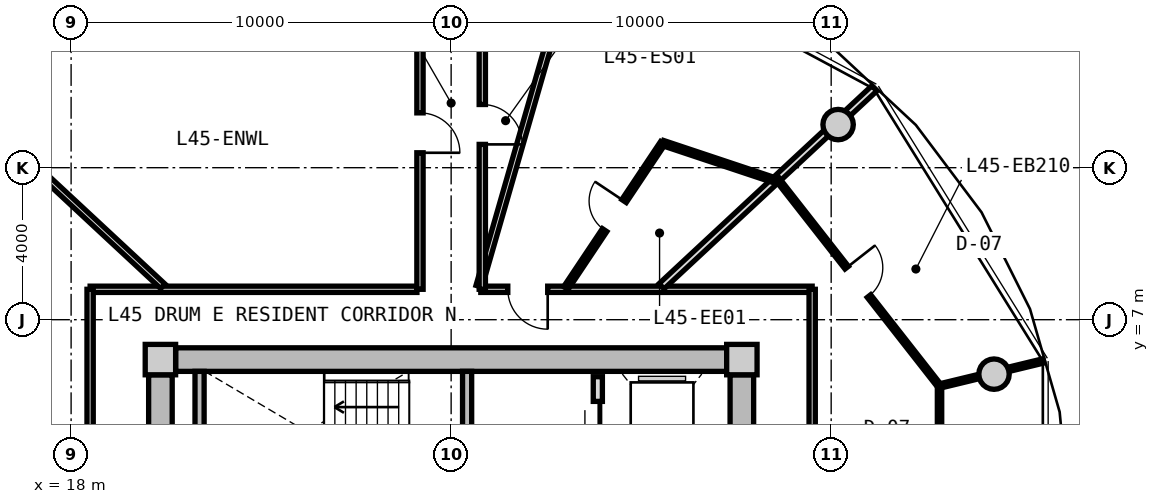
"""IFC4 building model, lengths in metres.
Left out: names, types, materials, properties, quantities, classifications, styles, units other than length and angle.
Written with IfcOpenShell. Run it as: python <this file> out.ifc"""

import sys

from ifc_helpers import new_model, si_unit, direction, frame, frame_2d, origin, origin_2d, place, context, subcontext, project, spatial, rectangle, circle, extrude, source, transform, mapped, element, fill, save


model = new_model("IFC4")
c1 = context("Model", 3, precision=1e-05, world=origin(), true_north=direction((0.0, 1.0)))
c2 = subcontext(c1, "Body", "Model", "MODEL_VIEW")
j1 = project(units=[si_unit("LENGTHUNIT", "METRE"), si_unit("PLANEANGLEUNIT", "RADIAN")], contexts=[c1])
p1 = place(None, origin())
s1 = spatial("IfcSite", under=j1, at=p1, CompositionType="ELEMENT")
p2 = place(p1, origin())
s2 = spatial("IfcBuilding", under=s1, at=p2, CompositionType="ELEMENT")
p3 = place(p2, frame((0.0, 0.0, 146.5)))
s3 = spatial("IfcBuildingStorey", under=s2, at=p3, CompositionType="ELEMENT", Elevation=146.5)
m1 = source(origin(), c2, "Body", "SweptSolid", [
    extrude(rectangle(XDim=0.8, YDim=0.8, at=origin_2d()), origin(), (0.0, 0.0, 1.0), 3.05),
])
for number, where, z_axis, x_axis in (
    (1, (35.65, 5.95, 0.0), (0.0, 0.0, 1.0), (1.0, 0.0, 0.0)),
    (2, (20.35, 5.95, 0.0), (0.0, 0.0, 1.0), (1.0, 0.0, 0.0)),
):
    element("IfcColumn", number, at=place(p3, frame(where, z_axis=z_axis, x_axis=x_axis)), inside=s3, PredefinedType="COLUMN", context=c2, shape_type="MappedRepresentation", body=[
        mapped(m1, transform((0.0, 0.0, 0.0), x_axis=(1.0, 0.0, 0.0), y_axis=(0.0, 1.0, 0.0), z_axis=(0.0, 0.0, 1.0), scale=1.0)),
    ])
m2 = source(origin(), c2, "Body", "SweptSolid", [
    extrude(rectangle(XDim=14.5, YDim=0.62, at=frame_2d((7.25, 0.0))), origin(), (0.0, 0.0, 1.0), 2.81),
])
p4 = place(p3, frame((20.75, 5.95, 0.0), z_axis=(0.0, 0.0, 1.0), x_axis=(1.0, 0.0, 0.0)))
e3 = element("IfcWall", 3, at=p4, inside=s3, PredefinedType="SHEAR", context=c2, shape_type="MappedRepresentation", body=[
    mapped(m2, transform((0.0, 0.0, 0.0), x_axis=(1.0, 0.0, 0.0), y_axis=(0.0, 1.0, 0.0), z_axis=(0.0, 0.0, 1.0), scale=1.0)),
])
m3 = source(origin(), c2, "Body", "SweptSolid", [
    extrude(rectangle(XDim=11.1, YDim=0.62, at=frame_2d((5.55, 0.0))), origin(), (0.0, 0.0, 1.0), 2.81),
])
p5 = place(p3, frame((20.35, -5.55, 0.0), z_axis=(0.0, 0.0, 1.0), x_axis=(0.0, 1.0, 0.0)))
e4 = element("IfcWall", 4, at=p5, inside=s3, PredefinedType="SHEAR", context=c2, shape_type="MappedRepresentation", body=[
    mapped(m3, transform((0.0, 0.0, 0.0), x_axis=(1.0, 0.0, 0.0), y_axis=(0.0, 1.0, 0.0), z_axis=(0.0, 0.0, 1.0), scale=1.0)),
])
p6 = place(p5, frame((3.8, 0.0, 0.0)))
e5 = element("IfcOpeningElement", 5, at=p6, cuts=e4, PredefinedType="OPENING", context=c2, shape_type="SweptSolid", body=[
    extrude(rectangle(XDim=1.2, YDim=2.15, at=frame_2d((0.6, 1.075))), frame((0.0, 0.32, 0.0), z_axis=(0.0, -1.0, 0.0), x_axis=(1.0, 0.0, 0.0)), (0.0, 0.0, 1.0), 0.64),
])
p7 = place(p3, frame((35.65, 5.55, 0.0), z_axis=(0.0, 0.0, 1.0), x_axis=(0.0, -1.0, 0.0)))
e6 = element("IfcWall", 6, at=p7, inside=s3, PredefinedType="SHEAR", context=c2, shape_type="MappedRepresentation", body=[
    mapped(m3, transform((0.0, 0.0, 0.0), x_axis=(1.0, 0.0, 0.0), y_axis=(0.0, 1.0, 0.0), z_axis=(0.0, 0.0, 1.0), scale=1.0)),
])
p8 = place(p7, frame((5.65, 0.0, 0.0)))
e7 = element("IfcOpeningElement", 7, at=p8, cuts=e6, PredefinedType="OPENING", context=c2, shape_type="SweptSolid", body=[
    extrude(rectangle(XDim=1.2, YDim=2.15, at=frame_2d((0.6, 1.075))), frame((0.0, 0.32, 0.0), z_axis=(0.0, -1.0, 0.0), x_axis=(1.0, 0.0, 0.0)), (0.0, 0.0, 1.0), 0.64),
])
m4 = source(origin(), c2, "Body", "SweptSolid", [
    extrude(circle(Radius=0.4, at=origin_2d()), origin(), (0.0, 0.0, 1.0), 3.05),
])
for number, where, z_axis, x_axis in (
    (8, (42.285, 5.567, 0.0), (0.0, 0.0, 1.0), (1.0, 0.0, 0.0)),
    (9, (38.183, 12.135, 0.0), (0.0, 0.0, 1.0), (1.0, 0.0, 0.0)),
):
    element("IfcColumn", number, at=place(p3, frame(where, z_axis=z_axis, x_axis=x_axis)), inside=s3, PredefinedType="COLUMN", context=c2, shape_type="MappedRepresentation", body=[
        mapped(m4, transform((0.0, 0.0, 0.0), x_axis=(1.0, 0.0, 0.0), y_axis=(0.0, 1.0, 0.0), z_axis=(0.0, 0.0, 1.0), scale=1.0)),
    ])
m5 = source(origin(), c2, "Body", "SweptSolid", [
    extrude(rectangle(XDim=3.19, YDim=0.24, at=frame_2d((1.595, 0.0))), origin(), (0.0, 0.0, 1.0), 2.81),
])
p9 = place(p3, frame((21.38, 2.45, 0.0), z_axis=(0.0, 0.0, 1.0), x_axis=(0.0, 1.0, 0.0)))
e10 = element("IfcWall", 10, at=p9, inside=s3, PredefinedType="PARTITIONING", context=c2, shape_type="MappedRepresentation", body=[
    mapped(m5, transform((0.0, 0.0, 0.0), x_axis=(1.0, 0.0, 0.0), y_axis=(0.0, 1.0, 0.0), z_axis=(0.0, 0.0, 1.0), scale=1.0)),
])
p10 = place(p3, frame((28.42, 2.45, 0.0), z_axis=(0.0, 0.0, 1.0), x_axis=(0.0, 1.0, 0.0)))
e11 = element("IfcWall", 11, at=p10, inside=s3, PredefinedType="PARTITIONING", context=c2, shape_type="MappedRepresentation", body=[
    mapped(m5, transform((0.0, 0.0, 0.0), x_axis=(1.0, 0.0, 0.0), y_axis=(0.0, 1.0, 0.0), z_axis=(0.0, 0.0, 1.0), scale=1.0)),
])
p11 = place(p10, frame((0.55, 0.0, 0.0)))
e12 = element("IfcOpeningElement", 12, at=p11, cuts=e11, PredefinedType="OPENING", context=c2, shape_type="SweptSolid", body=[
    extrude(rectangle(XDim=1.1, YDim=2.15, at=frame_2d((0.55, 1.075))), frame((0.0, 0.13, 0.0), z_axis=(0.0, -1.0, 0.0), x_axis=(1.0, 0.0, 0.0)), (0.0, 0.0, 1.0), 0.26),
])
m6 = source(origin(), c2, "Body", "SweptSolid", [
    extrude(rectangle(XDim=5.0, YDim=0.24, at=frame_2d((2.5, 0.0))), origin(), (0.0, 0.0, 1.0), 2.795),
])
p12 = place(p3, frame((31.86, 0.5, 0.0), z_axis=(0.0, 0.0, 1.0), x_axis=(0.0, 1.0, 0.0)))
e13 = element("IfcWall", 13, at=p12, inside=s3, PredefinedType="PARTITIONING", context=c2, shape_type="MappedRepresentation", body=[
    mapped(m6, transform((0.0, 0.0, 0.0), x_axis=(1.0, 0.0, 0.0), y_axis=(0.0, 1.0, 0.0), z_axis=(0.0, 0.0, 1.0), scale=1.0)),
])
p13 = place(p12, frame((3.05, 0.0, 0.0)))
e14 = element("IfcOpeningElement", 14, at=p13, cuts=e13, PredefinedType="OPENING", context=c2, shape_type="SweptSolid", body=[
    extrude(rectangle(XDim=1.3, YDim=2.2, at=frame_2d((0.65, 1.1))), frame((0.0, 0.13, 0.0), z_axis=(0.0, -1.0, 0.0), x_axis=(1.0, 0.0, 0.0)), (0.0, 0.0, 1.0), 0.26),
])
p14 = place(p12, frame((0.55, 0.0, 0.0)))
e15 = element("IfcOpeningElement", 15, at=p14, cuts=e13, PredefinedType="OPENING", context=c2, shape_type="SweptSolid", body=[
    extrude(rectangle(XDim=1.3, YDim=2.2, at=frame_2d((0.65, 1.1))), frame((0.0, 0.13, 0.0), z_axis=(0.0, -1.0, 0.0), x_axis=(1.0, 0.0, 0.0)), (0.0, 0.0, 1.0), 0.26),
])
m7 = source(origin(), c2, "Body", "SweptSolid", [
    extrude(rectangle(XDim=8.6, YDim=0.165, at=frame_2d((4.3, 0.0))), origin(), (0.0, 0.0, 1.0), 2.795),
])
p15 = place(p3, frame((18.5, 7.8, 0.0), z_axis=(0.0, 0.0, 1.0), x_axis=(1.0, 0.0, 0.0)))
e16 = element("IfcWall", 16, at=p15, inside=s3, PredefinedType="PARTITIONING", context=c2, shape_type="MappedRepresentation", body=[
    mapped(m7, transform((0.0, 0.0, 0.0), x_axis=(1.0, 0.0, 0.0), y_axis=(0.0, 1.0, 0.0), z_axis=(0.0, 0.0, 1.0), scale=1.0)),
])
m8 = source(origin(), c2, "Body", "SweptSolid", [
    extrude(rectangle(XDim=8.719, YDim=0.165, at=frame_2d((4.36, 0.0))), origin(), (0.0, 0.0, 1.0), 2.795),
])
p16 = place(p3, frame((28.781, 7.8, 0.0), z_axis=(0.0, 0.0, 1.0), x_axis=(1.0, 0.0, 0.0)))
e17 = element("IfcWall", 17, at=p16, inside=s3, PredefinedType="PARTITIONING", context=c2, shape_type="MappedRepresentation", body=[
    mapped(m8, transform((0.0, 0.0, 0.0), x_axis=(1.0, 0.0, 0.0), y_axis=(0.0, 1.0, 0.0), z_axis=(0.0, 0.0, 1.0), scale=1.0)),
])
p17 = place(p16, frame((0.71, 0.0, 0.0)))
e18 = element("IfcOpeningElement", 18, at=p17, cuts=e17, PredefinedType="OPENING", context=c2, shape_type="SweptSolid", body=[
    extrude(rectangle(XDim=1.05, YDim=2.15, at=frame_2d((0.525, 1.075))), frame((0.0, 0.093, 0.0), z_axis=(0.0, -1.0, 0.0), x_axis=(1.0, 0.0, 0.0)), (0.0, 0.0, 1.0), 0.185),
])
m9 = source(origin(), c2, "Body", "SweptSolid", [
    extrude(rectangle(XDim=15.6, YDim=0.165, at=frame_2d((7.8, 0.0))), origin(), (0.0, 0.0, 1.0), 2.795),
])
p18 = place(p3, frame((18.5, -7.8, 0.0), z_axis=(0.0, 0.0, 1.0), x_axis=(0.0, 1.0, 0.0)))
e19 = element("IfcWall", 19, at=p18, inside=s3, PredefinedType="PARTITIONING", context=c2, shape_type="MappedRepresentation", body=[
    mapped(m9, transform((0.0, 0.0, 0.0), x_axis=(1.0, 0.0, 0.0), y_axis=(0.0, 1.0, 0.0), z_axis=(0.0, 0.0, 1.0), scale=1.0)),
])
p19 = place(p18, frame((7.175, 0.0, 0.0)))
e20 = element("IfcOpeningElement", 20, at=p19, cuts=e19, PredefinedType="OPENING", context=c2, shape_type="SweptSolid", body=[
    extrude(rectangle(XDim=1.25, YDim=2.2, at=frame_2d((0.625, 1.1))), frame((0.0, 0.093, 0.0), z_axis=(0.0, -1.0, 0.0), x_axis=(1.0, 0.0, 0.0)), (0.0, 0.0, 1.0), 0.185),
])
p20 = place(p3, frame((37.5, 7.8, 0.0), z_axis=(0.0, 0.0, 1.0), x_axis=(0.0, -1.0, 0.0)))
e21 = element("IfcWall", 21, at=p20, inside=s3, PredefinedType="PARTITIONING", context=c2, shape_type="MappedRepresentation", body=[
    mapped(m9, transform((0.0, 0.0, 0.0), x_axis=(1.0, 0.0, 0.0), y_axis=(0.0, 1.0, 0.0), z_axis=(0.0, 0.0, 1.0), scale=1.0)),
])
p21 = place(p20, frame((5.687, 0.0, 0.0)))
e22 = element("IfcOpeningElement", 22, at=p21, cuts=e21, PredefinedType="OPENING", context=c2, shape_type="SweptSolid", body=[
    extrude(rectangle(XDim=1.05, YDim=2.15, at=frame_2d((0.525, 1.075))), frame((0.0, 0.093, 0.0), z_axis=(0.0, -1.0, 0.0), x_axis=(1.0, 0.0, 0.0)), (0.0, 0.0, 1.0), 0.185),
])
m10 = source(origin(), c2, "Body", "SweptSolid", [
    extrude(rectangle(XDim=9.73, YDim=0.165, at=frame_2d((4.865, 0.0))), origin(), (0.0, 0.0, 1.0), 2.345),
])
p22 = place(p3, frame((28.733, 7.88, 0.0), z_axis=(0.0, 0.0, 1.0), x_axis=(0.27679492614, 0.960929013436, 0.0)))
e23 = element("IfcWall", 23, at=p22, inside=s3, PredefinedType="PARTITIONING", context=c2, shape_type="MappedRepresentation", body=[
    mapped(m10, transform((0.0, 0.0, 0.0), x_axis=(1.0, 0.0, 0.0), y_axis=(0.0, 1.0, 0.0), z_axis=(0.0, 0.0, 1.0), scale=1.0)),
])
m11 = source(origin(), c2, "Body", "SweptSolid", [
    extrude(rectangle(XDim=7.648, YDim=0.165, at=frame_2d((3.824, 0.0))), origin(), (0.0, 0.0, 1.0), 2.345),
])
p23 = place(p3, frame((20.413, 7.88, 0.0), z_axis=(0.0, 0.0, 1.0), x_axis=(-0.732182665826, 0.681108320213, 0.0)))
e24 = element("IfcWall", 24, at=p23, inside=s3, PredefinedType="PARTITIONING", context=c2, shape_type="MappedRepresentation", body=[
    mapped(m11, transform((0.0, 0.0, 0.0), x_axis=(1.0, 0.0, 0.0), y_axis=(0.0, 1.0, 0.0), z_axis=(0.0, 0.0, 1.0), scale=1.0)),
])
m12 = source(origin(), c2, "Body", "SweptSolid", [
    extrude(rectangle(XDim=8.235, YDim=0.165, at=frame_2d((4.118, 0.0))), origin(), (0.0, 0.0, 1.0), 2.795),
])
p24 = place(p3, frame((27.18, 7.8, 0.0), z_axis=(0.0, 0.0, 1.0), x_axis=(0.0, 1.0, 0.0)))
e25 = element("IfcWall", 25, at=p24, inside=s3, PredefinedType="PARTITIONING", context=c2, shape_type="MappedRepresentation", body=[
    mapped(m12, transform((0.0, 0.0, 0.0), x_axis=(1.0, 0.0, 0.0), y_axis=(0.0, 1.0, 0.0), z_axis=(0.0, 0.0, 1.0), scale=1.0)),
])
p25 = place(p24, frame((3.593, 0.0, 0.0)))
e26 = element("IfcOpeningElement", 26, at=p25, cuts=e25, PredefinedType="OPENING", context=c2, shape_type="SweptSolid", body=[
    extrude(rectangle(XDim=1.05, YDim=2.15, at=frame_2d((0.525, 1.075))), frame((0.0, 0.093, 0.0), z_axis=(0.0, -1.0, 0.0), x_axis=(1.0, 0.0, 0.0)), (0.0, 0.0, 1.0), 0.185),
])
p26 = place(p3, frame((28.82, 7.8, 0.0), z_axis=(0.0, 0.0, 1.0), x_axis=(0.0, 1.0, 0.0)))
e27 = element("IfcWall", 27, at=p26, inside=s3, PredefinedType="PARTITIONING", context=c2, shape_type="MappedRepresentation", body=[
    mapped(m12, transform((0.0, 0.0, 0.0), x_axis=(1.0, 0.0, 0.0), y_axis=(0.0, 1.0, 0.0), z_axis=(0.0, 0.0, 1.0), scale=1.0)),
])
p27 = place(p26, frame((3.813, 0.0, 0.0)))
e28 = element("IfcOpeningElement", 28, at=p27, cuts=e27, PredefinedType="OPENING", context=c2, shape_type="SweptSolid", body=[
    extrude(rectangle(XDim=1.05, YDim=2.15, at=frame_2d((0.525, 1.075))), frame((0.0, 0.093, 0.0), z_axis=(0.0, -1.0, 0.0), x_axis=(1.0, 0.0, 0.0)), (0.0, 0.0, 1.0), 0.185),
])
m13 = source(origin(), c2, "Body", "SweptSolid", [
    extrude(rectangle(XDim=7.648, YDim=0.19, at=frame_2d((3.824, 0.0))), origin(), (0.0, 0.0, 1.0), 2.345),
])
p28 = place(p3, frame((33.538, 7.88, 0.0), z_axis=(0.0, 0.0, 1.0), x_axis=(0.732167856666, 0.681124239522, 0.0)))
e29 = element("IfcWall", 29, at=p28, inside=s3, PredefinedType="PARTITIONING", context=c2, shape_type="MappedRepresentation", body=[
    mapped(m13, transform((0.0, 0.0, 0.0), x_axis=(1.0, 0.0, 0.0), y_axis=(0.0, 1.0, 0.0), z_axis=(0.0, 0.0, 1.0), scale=1.0)),
])
m14 = source(origin(), c2, "Body", "SweptSolid", [
    extrude(rectangle(XDim=6.958, YDim=0.115, at=frame_2d((3.479, 0.0))), origin(), (0.0, 0.0, 1.0), 2.795),
])
p29 = place(p3, frame((40.851, -1.703, 0.0), z_axis=(0.0, 0.0, 1.0), x_axis=(0.0, 1.0, 0.0)))
e30 = element("IfcWall", 30, at=p29, inside=s3, PredefinedType="PARTITIONING", context=c2, shape_type="MappedRepresentation", body=[
    mapped(m14, transform((0.0, 0.0, 0.0), x_axis=(1.0, 0.0, 0.0), y_axis=(0.0, 1.0, 0.0), z_axis=(0.0, 0.0, 1.0), scale=1.0)),
])
p30 = place(p29, frame((3.004, 0.0, 0.0)))
e31 = element("IfcOpeningElement", 31, at=p30, cuts=e30, PredefinedType="OPENING", context=c2, shape_type="SweptSolid", body=[
    extrude(rectangle(XDim=0.95, YDim=2.1, at=frame_2d((0.475, 1.05))), frame((0.0, 0.067, 0.0), z_axis=(0.0, -1.0, 0.0), x_axis=(1.0, 0.0, 0.0)), (0.0, 0.0, 1.0), 0.135),
])
m15 = source(origin(), c2, "Body", "SweptSolid", [
    extrude(rectangle(XDim=6.966, YDim=0.115, at=frame_2d((3.483, 0.0))), origin(), (0.0, 0.0, 1.0), 2.795),
])
p31 = place(p3, frame((40.85, 5.254, 0.0), z_axis=(0.0, 0.0, 1.0), x_axis=(-0.616695640563, 0.787201681217, 0.0)))
e32 = element("IfcWall", 32, at=p31, inside=s3, PredefinedType="PARTITIONING", context=c2, shape_type="MappedRepresentation", body=[
    mapped(m15, transform((0.0, 0.0, 0.0), x_axis=(1.0, 0.0, 0.0), y_axis=(0.0, 1.0, 0.0), z_axis=(0.0, 0.0, 1.0), scale=1.0)),
])
p32 = place(p31, frame((3.008, 0.0, 0.0)))
e33 = element("IfcOpeningElement", 33, at=p32, cuts=e32, PredefinedType="OPENING", context=c2, shape_type="SweptSolid", body=[
    extrude(rectangle(XDim=0.95, YDim=2.1, at=frame_2d((0.475, 1.05))), frame((0.0, 0.067, 0.0), z_axis=(0.0, -1.0, 0.0), x_axis=(1.0, 0.0, 0.0)), (0.0, 0.0, 1.0), 0.135),
])
m16 = source(origin(), c2, "Body", "SweptSolid", [
    extrude(rectangle(XDim=2.818, YDim=0.115, at=frame_2d((1.409, 0.0))), origin(), (0.0, 0.0, 1.0), 2.345),
])
p33 = place(p3, frame((40.85, 5.254, 0.0), z_axis=(0.0, 0.0, 1.0), x_axis=(0.971949193017, 0.235190914353, 0.0)))
e34 = element("IfcWall", 34, at=p33, inside=s3, PredefinedType="PARTITIONING", context=c2, shape_type="MappedRepresentation", body=[
    mapped(m16, transform((0.0, 0.0, 0.0), x_axis=(1.0, 0.0, 0.0), y_axis=(0.0, 1.0, 0.0), z_axis=(0.0, 0.0, 1.0), scale=1.0)),
])
m17 = source(origin(), c2, "Body", "SweptSolid", [
    extrude(rectangle(XDim=4.593, YDim=0.14, at=frame_2d((2.296, 0.0))), origin(), (0.0, 0.0, 1.0), 2.795),
])
p34 = place(p3, frame((31.019, 7.83, 0.0), z_axis=(0.0, 0.0, 1.0), x_axis=(0.555362412301, 0.831608436107, 0.0)))
e35 = element("IfcWall", 35, at=p34, inside=s3, PredefinedType="PARTITIONING", context=c2, shape_type="MappedRepresentation", body=[
    mapped(m17, transform((0.0, 0.0, 0.0), x_axis=(1.0, 0.0, 0.0), y_axis=(0.0, 1.0, 0.0), z_axis=(0.0, 0.0, 1.0), scale=1.0)),
])
p35 = place(p34, frame((1.836, 0.0, 0.0)))
e36 = element("IfcOpeningElement", 36, at=p35, cuts=e35, PredefinedType="OPENING", context=c2, shape_type="SweptSolid", body=[
    extrude(rectangle(XDim=0.92, YDim=2.1, at=frame_2d((0.46, 1.05))), frame((0.0, 0.08, 0.0), z_axis=(0.0, -1.0, 0.0), x_axis=(1.0, 0.0, 0.0)), (0.0, 0.0, 1.0), 0.16),
])
m18 = source(origin(), c2, "Body", "SweptSolid", [
    extrude(rectangle(XDim=3.077, YDim=0.14, at=frame_2d((1.538, 0.0))), origin(), (0.0, 0.0, 1.0), 2.795),
])
p36 = place(p3, frame((33.57, 11.65, 0.0), z_axis=(0.0, 0.0, 1.0), x_axis=(0.948635676976, -0.3163705934, 0.0)))
e37 = element("IfcWall", 37, at=p36, inside=s3, PredefinedType="PARTITIONING", context=c2, shape_type="MappedRepresentation", body=[
    mapped(m18, transform((0.0, 0.0, 0.0), x_axis=(1.0, 0.0, 0.0), y_axis=(0.0, 1.0, 0.0), z_axis=(0.0, 0.0, 1.0), scale=1.0)),
])
m19 = source(origin(), c2, "Body", "SweptSolid", [
    extrude(rectangle(XDim=1.3, YDim=2.2, at=frame_2d((0.65, 1.1))), frame((0.0, 0.025, 0.0), z_axis=(0.0, -1.0, 0.0), x_axis=(1.0, 0.0, 0.0)), (0.0, 0.0, 1.0), 0.05),
])
p37 = place(p13, origin())
e38 = element("IfcDoor", 38, at=p37, inside=s3, OperationType="SLIDING_TO_LEFT", PredefinedType="DOOR", context=c2, shape_type="MappedRepresentation", body=[
    mapped(m19, transform((0.0, 0.0, 0.0), x_axis=(1.0, 0.0, 0.0), y_axis=(0.0, 1.0, 0.0), z_axis=(0.0, 0.0, 1.0), scale=1.0)),
])
fill(e14, e38)
m20 = source(origin(), c2, "Body", "SweptSolid", [
    extrude(rectangle(XDim=1.05, YDim=2.15, at=frame_2d((0.525, 1.075))), frame((0.0, 0.025, 0.0), z_axis=(0.0, -1.0, 0.0), x_axis=(1.0, 0.0, 0.0)), (0.0, 0.0, 1.0), 0.05),
])
p38 = place(p25, frame((1.05, 0.0, 0.0), z_axis=(0.0, 0.0, 1.0), x_axis=(-1.0, 0.0, 0.0)))
e39 = element("IfcDoor", 39, at=p38, inside=s3, OperationType="SINGLE_SWING_RIGHT", PredefinedType="DOOR", context=c2, shape_type="MappedRepresentation", body=[
    mapped(m20, transform((0.0, 0.0, 0.0), x_axis=(1.0, 0.0, 0.0), y_axis=(0.0, 1.0, 0.0), z_axis=(0.0, 0.0, 1.0), scale=1.0)),
])
fill(e26, e39)
p39 = place(p27, frame((1.05, 0.0, 0.0), z_axis=(0.0, 0.0, 1.0), x_axis=(-1.0, 0.0, 0.0)))
e40 = element("IfcDoor", 40, at=p39, inside=s3, OperationType="SINGLE_SWING_RIGHT", PredefinedType="DOOR", context=c2, shape_type="MappedRepresentation", body=[
    mapped(m20, transform((0.0, 0.0, 0.0), x_axis=(1.0, 0.0, 0.0), y_axis=(0.0, 1.0, 0.0), z_axis=(0.0, 0.0, 1.0), scale=1.0)),
])
fill(e28, e40)
m21 = source(origin(), c2, "Body", "SweptSolid", [
    extrude(rectangle(XDim=0.95, YDim=2.1, at=frame_2d((0.475, 1.05))), frame((0.0, 0.025, 0.0), z_axis=(0.0, -1.0, 0.0), x_axis=(1.0, 0.0, 0.0)), (0.0, 0.0, 1.0), 0.05),
])
p40 = place(p32, frame((0.95, 0.0, 0.0), z_axis=(0.0, 0.0, 1.0), x_axis=(-1.0, 0.0, 0.0)))
e41 = element("IfcDoor", 41, at=p40, inside=s3, OperationType="SINGLE_SWING_LEFT", PredefinedType="DOOR", context=c2, shape_type="MappedRepresentation", body=[
    mapped(m21, transform((0.0, 0.0, 0.0), x_axis=(1.0, 0.0, 0.0), y_axis=(0.0, 1.0, 0.0), z_axis=(0.0, 0.0, 1.0), scale=1.0)),
])
fill(e33, e41)
p41 = place(p17, frame((1.05, 0.0, 0.0), z_axis=(0.0, 0.0, 1.0), x_axis=(-1.0, 0.0, 0.0)))
e42 = element("IfcDoor", 42, at=p41, inside=s3, OperationType="SINGLE_SWING_LEFT", PredefinedType="DOOR", context=c2, shape_type="MappedRepresentation", body=[
    mapped(m20, transform((0.0, 0.0, 0.0), x_axis=(1.0, 0.0, 0.0), y_axis=(0.0, 1.0, 0.0), z_axis=(0.0, 0.0, 1.0), scale=1.0)),
])
fill(e18, e42)
m22 = source(origin(), c2, "Body", "SweptSolid", [
    extrude(rectangle(XDim=0.92, YDim=2.1, at=frame_2d((0.46, 1.05))), frame((0.0, 0.025, 0.0), z_axis=(0.0, -1.0, 0.0), x_axis=(1.0, 0.0, 0.0)), (0.0, 0.0, 1.0), 0.05),
])
p42 = place(p35, origin())
e43 = element("IfcDoor", 43, at=p42, inside=s3, OperationType="SINGLE_SWING_RIGHT", PredefinedType="DOOR", context=c2, shape_type="MappedRepresentation", body=[
    mapped(m22, transform((0.0, 0.0, 0.0), x_axis=(1.0, 0.0, 0.0), y_axis=(0.0, 1.0, 0.0), z_axis=(0.0, 0.0, 1.0), scale=1.0)),
])
fill(e36, e43)
save(model, sys.argv[1])
